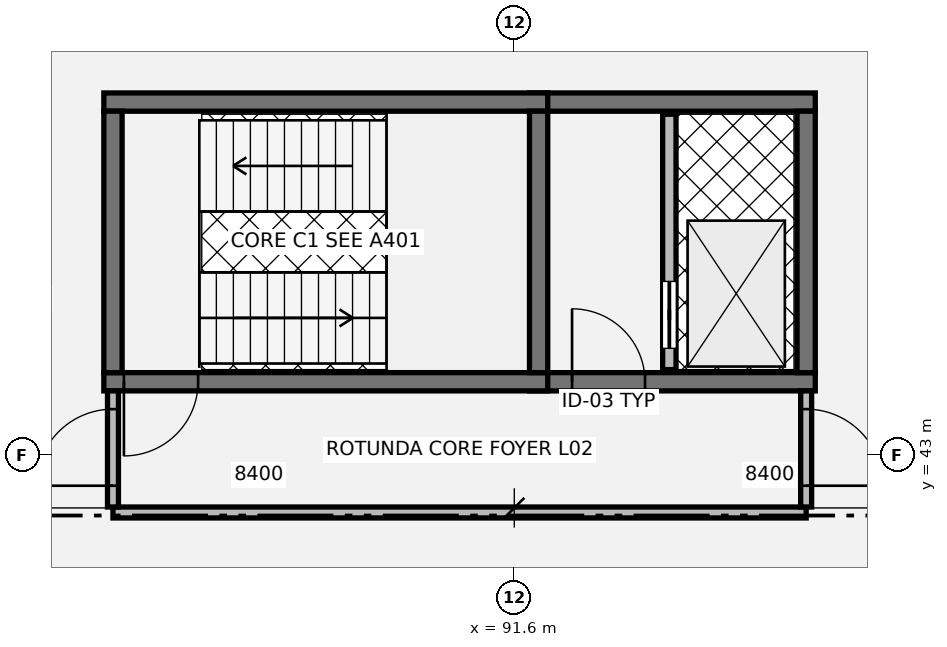
"""IFC4 building model, lengths in metres.
Left out: names, types, materials, properties, quantities, classifications, styles, units other than length and angle.
Written with IfcOpenShell. Run it as: python <this file> out.ifc"""

import sys

from ifc_helpers import new_model, si_unit, direction, frame, frame_2d, origin, place, context, subcontext, project, spatial, rectangle, circle, extrude, element, fill, save


model = new_model("IFC4")
c1 = context("Model", 3, precision=1e-05, world=origin(), true_north=direction((0.0, 1.0)))
c2 = subcontext(c1, "Body", "Model", "MODEL_VIEW")
j1 = project(units=[si_unit("LENGTHUNIT", "METRE"), si_unit("PLANEANGLEUNIT", "RADIAN")], contexts=[c1])
p1 = place(None, origin())
s1 = spatial("IfcSite", under=j1, at=p1, CompositionType="ELEMENT")
p2 = place(p1, origin())
s2 = spatial("IfcBuilding", under=s1, at=p2, CompositionType="ELEMENT")
p3 = place(p2, frame((0.0, 0.0, 9.18)))
s3 = spatial("IfcBuildingStorey", under=s2, at=p3, CompositionType="ELEMENT", Elevation=9.18)
p4 = place(p3, frame((85.271, 50.658, 0.0), z_axis=(0.0, 0.0, 1.0), x_axis=(-0.897210232885, -0.441603666205, 0.0)))
e1 = element("IfcWall", 1, at=p4, inside=s3, PredefinedType="SOLIDWALL", context=c2, shape_type="SweptSolid", body=[
    extrude(rectangle(XDim=2.145, YDim=0.295, at=frame_2d((1.072, 0.0))), origin(), (0.0, 0.0, 1.0), 3.855),
])
p5 = place(p4, frame((0.332, 0.0, 0.25)))
e2 = element("IfcOpeningElement", 2, at=p5, cuts=e1, PredefinedType="OPENING", context=c2, shape_type="SweptSolid", body=[
    extrude(circle(Radius=0.74, at=frame_2d((0.74, 0.74))), frame((0.0, 0.157, 0.0), z_axis=(0.0, -1.0, 0.0), x_axis=(1.0, 0.0, 0.0)), (0.0, 0.0, 1.0), 0.315),
])
p6 = place(p4, frame((0.332, 0.0, 2.03)))
e3 = element("IfcOpeningElement", 3, at=p6, cuts=e1, PredefinedType="OPENING", context=c2, shape_type="SweptSolid", body=[
    extrude(circle(Radius=0.74, at=frame_2d((0.74, 0.74))), frame((0.0, 0.157, 0.0), z_axis=(0.0, -1.0, 0.0), x_axis=(1.0, 0.0, 0.0)), (0.0, 0.0, 1.0), 0.315),
])
p7 = place(p3, frame((91.85, 44.2, 0.0), z_axis=(0.0, 0.0, 1.0), x_axis=(1.0, 0.0, 0.0)))
e4 = element("IfcWall", 4, at=p7, inside=s3, PredefinedType="SHEAR", context=c2, shape_type="SweptSolid", body=[
    extrude(rectangle(XDim=4.7, YDim=0.3, at=frame_2d((2.35, 0.0))), origin(), (0.0, 0.0, 1.0), 3.845),
])
p8 = place(p7, frame((0.7, 0.0, 0.0)))
e5 = element("IfcOpeningElement", 5, at=p8, cuts=e4, PredefinedType="OPENING", context=c2, shape_type="SweptSolid", body=[
    extrude(rectangle(XDim=1.2, YDim=2.16, at=frame_2d((0.6, 1.08))), frame((0.0, 0.16, 0.0), z_axis=(0.0, -1.0, 0.0), x_axis=(1.0, 0.0, 0.0)), (0.0, 0.0, 1.0), 0.32),
])
p9 = place(p3, frame((96.55, 48.8, 0.0), z_axis=(0.0, 0.0, 1.0), x_axis=(-1.0, 0.0, 0.0)))
e6 = element("IfcWall", 6, at=p9, inside=s3, PredefinedType="SHEAR", context=c2, shape_type="SweptSolid", body=[
    extrude(rectangle(XDim=4.7, YDim=0.3, at=frame_2d((2.35, 0.0))), origin(), (0.0, 0.0, 1.0), 3.845),
])
p10 = place(p3, frame((96.4, 44.35, 0.0), z_axis=(0.0, 0.0, 1.0), x_axis=(0.0, 1.0, 0.0)))
e7 = element("IfcWall", 7, at=p10, inside=s3, PredefinedType="SHEAR", context=c2, shape_type="SweptSolid", body=[
    extrude(rectangle(XDim=4.3, YDim=0.3, at=frame_2d((2.15, 0.0))), origin(), (0.0, 0.0, 1.0), 3.845),
])
p11 = place(p3, frame((94.15, 44.4, 0.0), z_axis=(0.0, 0.0, 1.0), x_axis=(0.0, 1.0, 0.0)))
e8 = element("IfcWall", 8, at=p11, inside=s3, PredefinedType="SOLIDWALL", context=c2, shape_type="SweptSolid", body=[
    extrude(rectangle(XDim=4.2, YDim=0.22, at=frame_2d((2.1, 0.0))), origin(), (0.0, 0.0, 1.0), 3.845),
])
p12 = place(p11, frame((0.35, 0.0, 0.0)))
e9 = element("IfcOpeningElement", 9, at=p12, cuts=e8, PredefinedType="OPENING", context=c2, shape_type="SweptSolid", body=[
    extrude(rectangle(XDim=1.1, YDim=2.15, at=frame_2d((0.55, 1.075))), frame((0.0, 0.12, 0.0), z_axis=(0.0, -1.0, 0.0), x_axis=(1.0, 0.0, 0.0)), (0.0, 0.0, 1.0), 0.24),
])
p13 = place(p3, frame((84.85, 44.2, 0.0), z_axis=(0.0, 0.0, 1.0), x_axis=(1.0, 0.0, 0.0)))
e10 = element("IfcWall", 10, at=p13, inside=s3, PredefinedType="SHEAR", context=c2, shape_type="SweptSolid", body=[
    extrude(rectangle(XDim=7.3, YDim=0.3, at=frame_2d((3.65, 0.0))), origin(), (0.0, 0.0, 1.0), 3.845),
])
p14 = place(p13, frame((0.33, 0.0, 0.0)))
e11 = element("IfcOpeningElement", 11, at=p14, cuts=e10, PredefinedType="OPENING", context=c2, shape_type="SweptSolid", body=[
    extrude(rectangle(XDim=1.22, YDim=2.18, at=frame_2d((0.61, 1.09))), frame((0.0, 0.16, 0.0), z_axis=(0.0, -1.0, 0.0), x_axis=(1.0, 0.0, 0.0)), (0.0, 0.0, 1.0), 0.32),
])
p15 = place(p3, frame((84.85, 48.8, 0.0), z_axis=(0.0, 0.0, 1.0), x_axis=(1.0, 0.0, 0.0)))
e12 = element("IfcWall", 12, at=p15, inside=s3, PredefinedType="SHEAR", context=c2, shape_type="SweptSolid", body=[
    extrude(rectangle(XDim=7.3, YDim=0.3, at=frame_2d((3.65, 0.0))), origin(), (0.0, 0.0, 1.0), 3.845),
])
for number, where, z_axis, x_axis in (
    (13, (85.0, 44.35, 0.0), (0.0, 0.0, 1.0), (0.0, 1.0, 0.0)),
    (14, (92.0, 44.35, 0.0), (0.0, 0.0, 1.0), (0.0, 1.0, 0.0)),
):
    element("IfcWall", number, at=place(p3, frame(where, z_axis=z_axis, x_axis=x_axis)), inside=s3, PredefinedType="SHEAR", context=c2, shape_type="SweptSolid", body=[
        extrude(rectangle(XDim=4.3, YDim=0.3, at=frame_2d((2.15, 0.0))), origin(), (0.0, 0.0, 1.0), 3.845),
    ])
p16 = place(p3, frame((85.0, 42.05, 0.0), z_axis=(0.0, 0.0, 1.0), x_axis=(1.0, 0.0, 0.0)))
e15 = element("IfcWall", 15, at=p16, inside=s3, PredefinedType="PARTITIONING", context=c2, shape_type="SweptSolid", body=[
    extrude(rectangle(XDim=11.4, YDim=0.18, at=frame_2d((5.7, 0.0))), origin(), (0.0, 0.0, 1.0), 3.23),
])
p17 = place(p3, frame((85.0, 42.14, 0.0), z_axis=(0.0, 0.0, 1.0), x_axis=(0.0, 1.0, 0.0)))
e16 = element("IfcWall", 16, at=p17, inside=s3, PredefinedType="PARTITIONING", context=c2, shape_type="SweptSolid", body=[
    extrude(rectangle(XDim=1.91, YDim=0.18, at=frame_2d((0.955, 0.0))), origin(), (0.0, 0.0, 1.0), 3.23),
])
p18 = place(p17, frame((0.35, 0.0, 0.0)))
e17 = element("IfcOpeningElement", 17, at=p18, cuts=e16, PredefinedType="OPENING", context=c2, shape_type="SweptSolid", body=[
    extrude(rectangle(XDim=1.26, YDim=2.2, at=frame_2d((0.63, 1.1))), frame((0.0, 0.1, 0.0), z_axis=(0.0, -1.0, 0.0), x_axis=(1.0, 0.0, 0.0)), (0.0, 0.0, 1.0), 0.2),
])
p19 = place(p3, frame((96.4, 42.14, 0.0), z_axis=(0.0, 0.0, 1.0), x_axis=(0.0, 1.0, 0.0)))
e18 = element("IfcWall", 18, at=p19, inside=s3, PredefinedType="PARTITIONING", context=c2, shape_type="SweptSolid", body=[
    extrude(rectangle(XDim=1.91, YDim=0.18, at=frame_2d((0.955, 0.0))), origin(), (0.0, 0.0, 1.0), 3.23),
])
p20 = place(p19, frame((0.35, 0.0, 0.0)))
e19 = element("IfcOpeningElement", 19, at=p20, cuts=e18, PredefinedType="OPENING", context=c2, shape_type="SweptSolid", body=[
    extrude(rectangle(XDim=1.26, YDim=2.2, at=frame_2d((0.63, 1.1))), frame((0.0, 0.1, 0.0), z_axis=(0.0, -1.0, 0.0), x_axis=(1.0, 0.0, 0.0)), (0.0, 0.0, 1.0), 0.2),
])
p21 = place(p8, origin())
e20 = element("IfcDoor", 20, at=p21, inside=s3, OperationType="SINGLE_SWING_LEFT", PredefinedType="DOOR", context=c2, shape_type="SweptSolid", body=[
    extrude(rectangle(XDim=1.2, YDim=2.16, at=frame_2d((0.6, 1.08))), frame((0.0, 0.025, 0.0), z_axis=(0.0, -1.0, 0.0), x_axis=(1.0, 0.0, 0.0)), (0.0, 0.0, 1.0), 0.05),
])
fill(e5, e20)
p22 = place(p12, origin())
e21 = element("IfcDoor", 21, at=p22, inside=s3, OperationType="SLIDING_TO_LEFT", PredefinedType="DOOR", context=c2, shape_type="SweptSolid", body=[
    extrude(rectangle(XDim=1.1, YDim=2.15, at=frame_2d((0.55, 1.075))), frame((0.0, 0.025, 0.0), z_axis=(0.0, -1.0, 0.0), x_axis=(1.0, 0.0, 0.0)), (0.0, 0.0, 1.0), 0.05),
])
fill(e9, e21)
p23 = place(p14, origin())
e22 = element("IfcDoor", 22, at=p23, inside=s3, OperationType="SINGLE_SWING_RIGHT", PredefinedType="DOOR", context=c2, shape_type="SweptSolid", body=[
    extrude(rectangle(XDim=1.22, YDim=2.18, at=frame_2d((0.61, 1.09))), frame((0.0, 0.025, 0.0), z_axis=(0.0, -1.0, 0.0), x_axis=(1.0, 0.0, 0.0)), (0.0, 0.0, 1.0), 0.05),
])
fill(e11, e22)
p24 = place(p18, origin())
e23 = element("IfcDoor", 23, at=p24, inside=s3, OperationType="SINGLE_SWING_LEFT", PredefinedType="DOOR", context=c2, shape_type="SweptSolid", body=[
    extrude(rectangle(XDim=1.26, YDim=2.2, at=frame_2d((0.63, 1.1))), frame((0.0, 0.025, 0.0), z_axis=(0.0, -1.0, 0.0), x_axis=(1.0, 0.0, 0.0)), (0.0, 0.0, 1.0), 0.05),
])
fill(e17, e23)
p25 = place(p20, origin())
e24 = element("IfcDoor", 24, at=p25, inside=s3, OperationType="SINGLE_SWING_RIGHT", PredefinedType="DOOR", context=c2, shape_type="SweptSolid", body=[
    extrude(rectangle(XDim=1.26, YDim=2.2, at=frame_2d((0.63, 1.1))), frame((0.0, 0.025, 0.0), z_axis=(0.0, -1.0, 0.0), x_axis=(1.0, 0.0, 0.0)), (0.0, 0.0, 1.0), 0.05),
])
fill(e19, e24)
save(model, sys.argv[1])
